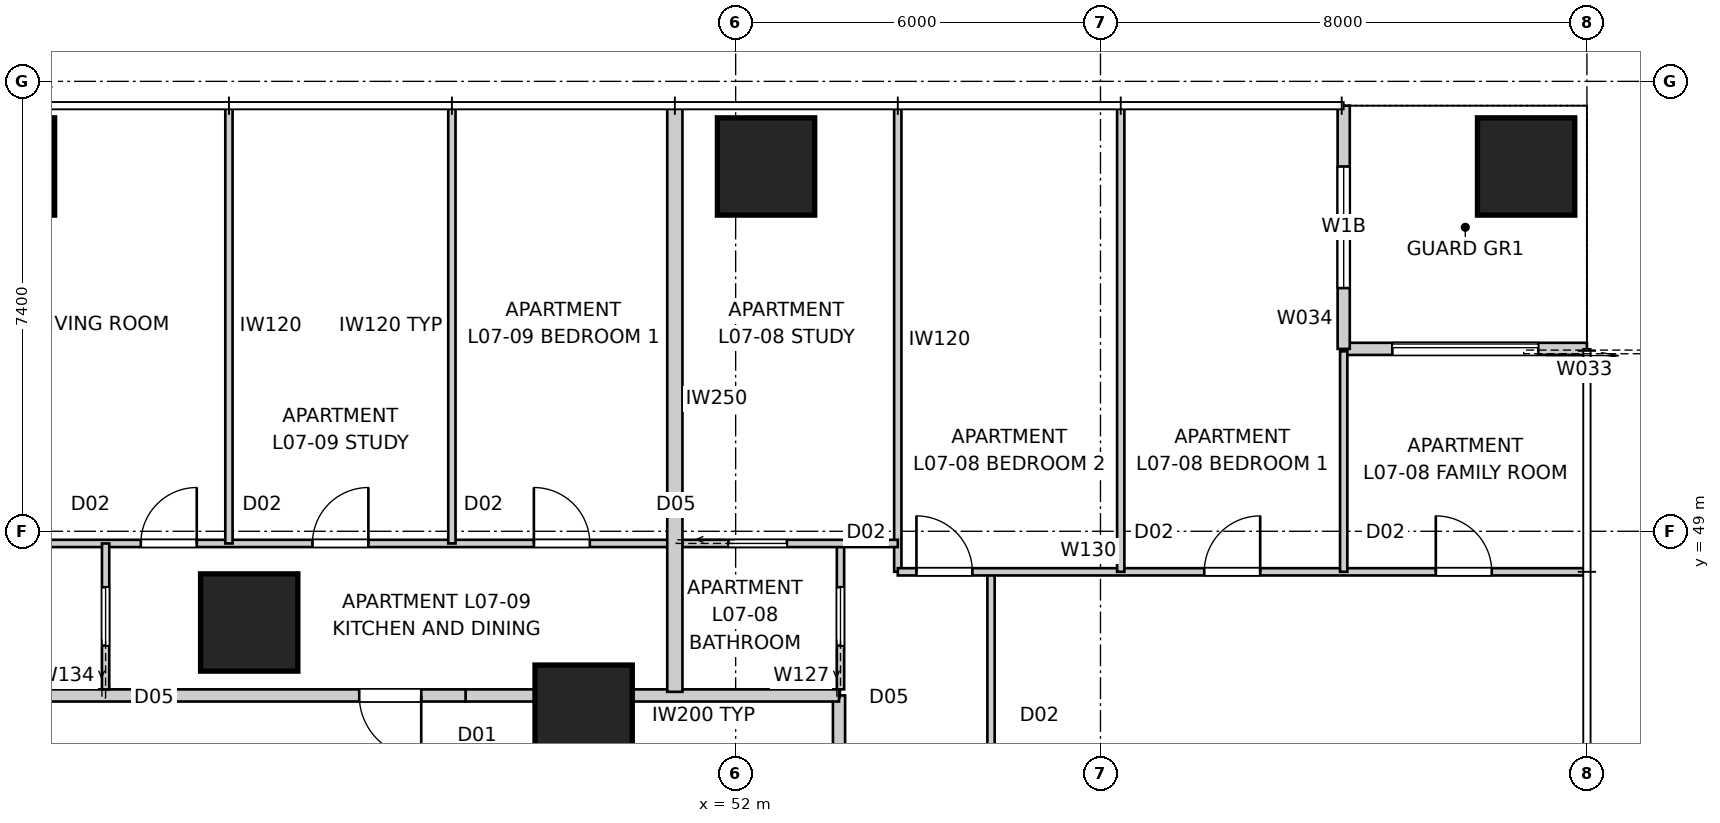
"""IFC4 building model, lengths in metres.
Left out: names, types, materials, properties, quantities, classifications, styles, units other than length and angle.
Written with IfcOpenShell. Run it as: python <this file> out.ifc"""

import sys

from ifc_helpers import new_model, si_unit, direction, frame, frame_2d, origin, origin_2d, place, context, subcontext, project, spatial, rectangle, extrude, element, fill, save


model = new_model("IFC4")
c1 = context("Model", 3, precision=1e-05, world=origin(), true_north=direction((0.0, 1.0)))
c2 = subcontext(c1, "Body", "Model", "MODEL_VIEW")
j1 = project(units=[si_unit("LENGTHUNIT", "METRE"), si_unit("PLANEANGLEUNIT", "RADIAN")], contexts=[c1])
p1 = place(None, origin())
s1 = spatial("IfcSite", under=j1, at=p1, CompositionType="ELEMENT")
p2 = place(p1, origin())
s2 = spatial("IfcBuilding", under=s1, at=p2, CompositionType="ELEMENT")
p3 = place(p2, frame((0.0, 0.0, 28.6)))
s3 = spatial("IfcBuildingStorey", under=s2, at=p3, CompositionType="ELEMENT", Elevation=28.6)
for number, where, z_axis, x_axis in (
    (1, (65.0, 55.0, 0.0), (0.0, 0.0, 1.0), (1.0, 0.0, 0.0)),
    (2, (52.5, 55.0, 0.0), (0.0, 0.0, 1.0), (1.0, 0.0, 0.0)),
    (3, (40.0, 55.0, 0.0), (0.0, 0.0, 1.0), (1.0, 0.0, 0.0)),
    (4, (49.5, 46.0, 0.0), (0.0, 0.0, 1.0), (1.0, 0.0, 0.0)),
    (5, (44.0, 47.5, 0.0), (0.0, 0.0, 1.0), (1.0, 0.0, 0.0)),
):
    element("IfcColumn", number, at=place(p3, frame(where, z_axis=z_axis, x_axis=x_axis)), inside=s3, PredefinedType="COLUMN", context=c2, shape_type="SweptSolid", body=[
        extrude(rectangle(XDim=1.6, YDim=1.6, at=origin_2d()), origin(), (0.0, 0.0, 1.0), 3.4),
    ])
p4 = place(p3, frame((66.0, 52.0, 0.0), z_axis=(0.0, 0.0, 1.0), x_axis=(-1.0, 0.0, 0.0)))
e6 = element("IfcWall", 6, at=p4, inside=s3, PredefinedType="SOLIDWALL", context=c2, shape_type="SweptSolid", body=[
    extrude(rectangle(XDim=4.0, YDim=0.2, at=frame_2d((2.0, 0.0))), origin(), (0.0, 0.0, 1.0), 3.25),
])
p5 = place(p4, frame((0.8, 0.0, 0.0)))
e7 = element("IfcOpeningElement", 7, at=p5, cuts=e6, PredefinedType="OPENING", context=c2, shape_type="SweptSolid", body=[
    extrude(rectangle(XDim=2.4, YDim=2.1, at=frame_2d((1.2, 1.05))), frame((0.0, 0.11, 0.0), z_axis=(0.0, -1.0, 0.0), x_axis=(1.0, 0.0, 0.0)), (0.0, 0.0, 1.0), 0.22),
])
p6 = place(p3, frame((62.0, 52.0, 0.0), z_axis=(0.0, 0.0, 1.0), x_axis=(0.0, 1.0, 0.0)))
e8 = element("IfcWall", 8, at=p6, inside=s3, PredefinedType="SOLIDWALL", context=c2, shape_type="SweptSolid", body=[
    extrude(rectangle(XDim=4.0, YDim=0.2, at=frame_2d((2.0, 0.0))), origin(), (0.0, 0.0, 1.0), 3.25),
])
p7 = place(p6, frame((1.0, 0.0, 0.45)))
e9 = element("IfcOpeningElement", 9, at=p7, cuts=e8, PredefinedType="OPENING", context=c2, shape_type="SweptSolid", body=[
    extrude(rectangle(XDim=2.0, YDim=1.8, at=frame_2d((1.0, 0.9))), frame((0.0, 0.11, 0.0), z_axis=(0.0, -1.0, 0.0), x_axis=(1.0, 0.0, 0.0)), (0.0, 0.0, 1.0), 0.22),
])
p8 = place(p3, frame((53.7, 13.7, 0.0), z_axis=(0.0, 0.0, 1.0), x_axis=(0.0, 1.0, 0.0)))
e10 = element("IfcWall", 10, at=p8, inside=s3, PredefinedType="PARTITIONING", context=c2, shape_type="SweptSolid", body=[
    extrude(rectangle(XDim=32.6, YDim=0.2, at=frame_2d((16.3, 0.0))), origin(), (0.0, 0.0, 1.0), 3.25),
])
p9 = place(p8, frame((2.315, 0.0, 0.0)))
e11 = element("IfcOpeningElement", 11, at=p9, cuts=e10, PredefinedType="OPENING", context=c2, shape_type="SweptSolid", body=[
    extrude(rectangle(XDim=1.02, YDim=2.34, at=frame_2d((0.51, 1.17))), frame((0.0, 0.11, 0.0), z_axis=(0.0, -1.0, 0.0), x_axis=(1.0, 0.0, 0.0)), (0.0, 0.0, 1.0), 0.22),
])
p10 = place(p8, frame((29.265, 0.0, 0.0)))
e12 = element("IfcOpeningElement", 12, at=p10, cuts=e10, PredefinedType="OPENING", context=c2, shape_type="SweptSolid", body=[
    extrude(rectangle(XDim=1.02, YDim=2.34, at=frame_2d((0.51, 1.17))), frame((0.0, 0.11, 0.0), z_axis=(0.0, -1.0, 0.0), x_axis=(1.0, 0.0, 0.0)), (0.0, 0.0, 1.0), 0.22),
])
p11 = place(p8, frame((20.646, 0.0, 0.0)))
e13 = element("IfcOpeningElement", 13, at=p11, cuts=e10, PredefinedType="OPENING", context=c2, shape_type="SweptSolid", body=[
    extrude(rectangle(XDim=1.02, YDim=2.34, at=frame_2d((0.51, 1.17))), frame((0.0, 0.11, 0.0), z_axis=(0.0, -1.0, 0.0), x_axis=(1.0, 0.0, 0.0)), (0.0, 0.0, 1.0), 0.22),
])
p12 = place(p8, frame((13.626, 0.0, 0.0)))
e14 = element("IfcOpeningElement", 14, at=p12, cuts=e10, PredefinedType="OPENING", context=c2, shape_type="SweptSolid", body=[
    extrude(rectangle(XDim=1.02, YDim=2.34, at=frame_2d((0.51, 1.17))), frame((0.0, 0.11, 0.0), z_axis=(0.0, -1.0, 0.0), x_axis=(1.0, 0.0, 0.0)), (0.0, 0.0, 1.0), 0.22),
])
p13 = place(p3, frame((53.7, 46.3, 0.0), z_axis=(0.0, 0.0, 1.0), x_axis=(-1.0, 0.0, 0.0)))
e15 = element("IfcWall", 15, at=p13, inside=s3, PredefinedType="PARTITIONING", context=c2, shape_type="SweptSolid", body=[
    extrude(rectangle(XDim=4.458, YDim=0.2, at=frame_2d((2.229, 0.0))), origin(), (0.0, 0.0, 1.0), 3.25),
])
p14 = place(p3, frame((49.242, 46.3, 0.0), z_axis=(0.0, 0.0, 1.0), x_axis=(-1.0, 0.0, 0.0)))
e16 = element("IfcWall", 16, at=p14, inside=s3, PredefinedType="PARTITIONING", context=c2, shape_type="SweptSolid", body=[
    extrude(rectangle(XDim=1.683, YDim=0.2, at=frame_2d((0.842, 0.0))), origin(), (0.0, 0.0, 1.0), 2.55),
])
p15 = place(p3, frame((47.558, 46.3, 0.0), z_axis=(0.0, 0.0, 1.0), x_axis=(-1.0, 0.0, 0.0)))
e17 = element("IfcWall", 17, at=p15, inside=s3, PredefinedType="PARTITIONING", context=c2, shape_type="SweptSolid", body=[
    extrude(rectangle(XDim=15.117, YDim=0.2, at=frame_2d((7.558, 0.0))), origin(), (0.0, 0.0, 1.0), 3.25),
])
p16 = place(p15, frame((0.729, 0.0, 0.0)))
e18 = element("IfcOpeningElement", 18, at=p16, cuts=e17, PredefinedType="OPENING", context=c2, shape_type="SweptSolid", body=[
    extrude(rectangle(XDim=1.02, YDim=2.34, at=frame_2d((0.51, 1.17))), frame((0.0, 0.11, 0.0), z_axis=(0.0, -1.0, 0.0), x_axis=(1.0, 0.0, 0.0)), (0.0, 0.0, 1.0), 0.22),
])
p17 = place(p3, frame((51.0, 56.0, 0.0), z_axis=(0.0, 0.0, 1.0), x_axis=(0.0, -1.0, 0.0)))
e19 = element("IfcWall", 19, at=p17, inside=s3, PredefinedType="PARTITIONING", context=c2, shape_type="SweptSolid", body=[
    extrude(rectangle(XDim=9.64, YDim=0.25, at=frame_2d((4.82, 0.0))), origin(), (0.0, 0.0, 1.0), 3.25),
])
p18 = place(p3, frame((53.724, 46.4, 0.0), z_axis=(0.0, 0.0, 1.0), x_axis=(0.0, 1.0, 0.0)))
e20 = element("IfcWall", 20, at=p18, inside=s3, PredefinedType="PARTITIONING", context=c2, shape_type="SweptSolid", body=[
    extrude(rectangle(XDim=2.4, YDim=0.12, at=frame_2d((1.2, 0.0))), origin(), (0.0, 0.0, 1.0), 3.25),
])
p19 = place(p18, frame((0.72, 0.0, 0.0)))
e21 = element("IfcOpeningElement", 21, at=p19, cuts=e20, PredefinedType="OPENING", context=c2, shape_type="SweptSolid", body=[
    extrude(rectangle(XDim=0.96, YDim=2.1, at=frame_2d((0.48, 1.05))), frame((0.0, 0.07, 0.0), z_axis=(0.0, -1.0, 0.0), x_axis=(1.0, 0.0, 0.0)), (0.0, 0.0, 1.0), 0.14),
])
p20 = place(p3, frame((56.2, 48.333, 0.0), z_axis=(0.0, 0.0, 1.0), x_axis=(0.0, -1.0, 0.0)))
e22 = element("IfcWall", 22, at=p20, inside=s3, PredefinedType="PARTITIONING", context=c2, shape_type="SweptSolid", body=[
    extrude(rectangle(XDim=7.333, YDim=0.12, at=frame_2d((3.667, 0.0))), origin(), (0.0, 0.0, 1.0), 3.25),
])
p21 = place(p20, frame((3.207, 0.0, 0.0)))
e23 = element("IfcOpeningElement", 23, at=p21, cuts=e22, PredefinedType="OPENING", context=c2, shape_type="SweptSolid", body=[
    extrude(rectangle(XDim=0.92, YDim=2.34, at=frame_2d((0.46, 1.17))), frame((0.0, 0.07, 0.0), z_axis=(0.0, -1.0, 0.0), x_axis=(1.0, 0.0, 0.0)), (0.0, 0.0, 1.0), 0.14),
])
p22 = place(p3, frame((54.667, 55.96, 0.0), z_axis=(0.0, 0.0, 1.0), x_axis=(0.0, -1.0, 0.0)))
e24 = element("IfcWall", 24, at=p22, inside=s3, PredefinedType="PARTITIONING", context=c2, shape_type="SweptSolid", body=[
    extrude(rectangle(XDim=7.627, YDim=0.12, at=frame_2d((3.813, 0.0))), origin(), (0.0, 0.0, 1.0), 2.638),
])
p23 = place(p3, frame((54.667, 48.333, 0.0), z_axis=(0.0, 0.0, 1.0), x_axis=(1.0, 0.0, 0.0)))
e25 = element("IfcWall", 25, at=p23, inside=s3, PredefinedType="PARTITIONING", context=c2, shape_type="SweptSolid", body=[
    extrude(rectangle(XDim=11.293, YDim=0.12, at=frame_2d((5.646, 0.0))), origin(), (0.0, 0.0, 1.0), 3.25),
])
p24 = place(p23, frame((0.307, 0.0, 0.0)))
e26 = element("IfcOpeningElement", 26, at=p24, cuts=e25, PredefinedType="OPENING", context=c2, shape_type="SweptSolid", body=[
    extrude(rectangle(XDim=0.92, YDim=2.34, at=frame_2d((0.46, 1.17))), frame((0.0, 0.07, 0.0), z_axis=(0.0, -1.0, 0.0), x_axis=(1.0, 0.0, 0.0)), (0.0, 0.0, 1.0), 0.14),
])
p25 = place(p23, frame((8.848, 0.0, 0.0)))
e27 = element("IfcOpeningElement", 27, at=p25, cuts=e25, PredefinedType="OPENING", context=c2, shape_type="SweptSolid", body=[
    extrude(rectangle(XDim=0.92, YDim=2.34, at=frame_2d((0.46, 1.17))), frame((0.0, 0.07, 0.0), z_axis=(0.0, -1.0, 0.0), x_axis=(1.0, 0.0, 0.0)), (0.0, 0.0, 1.0), 0.14),
])
p26 = place(p23, frame((5.04, 0.0, 0.0)))
e28 = element("IfcOpeningElement", 28, at=p26, cuts=e25, PredefinedType="OPENING", context=c2, shape_type="SweptSolid", body=[
    extrude(rectangle(XDim=0.92, YDim=2.34, at=frame_2d((0.46, 1.17))), frame((0.0, 0.07, 0.0), z_axis=(0.0, -1.0, 0.0), x_axis=(1.0, 0.0, 0.0)), (0.0, 0.0, 1.0), 0.14),
])
p27 = place(p3, frame((25.333, 48.8, 0.0), z_axis=(0.0, 0.0, 1.0), x_axis=(1.0, 0.0, 0.0)))
e29 = element("IfcWall", 29, at=p27, inside=s3, PredefinedType="PARTITIONING", context=c2, shape_type="SweptSolid", body=[
    extrude(rectangle(XDim=29.333, YDim=0.12, at=frame_2d((14.667, 0.0))), origin(), (0.0, 0.0, 1.0), 3.25),
])
p28 = place(p27, frame((19.707, 0.0, 0.0)))
e30 = element("IfcOpeningElement", 30, at=p28, cuts=e29, PredefinedType="OPENING", context=c2, shape_type="SweptSolid", body=[
    extrude(rectangle(XDim=0.92, YDim=2.34, at=frame_2d((0.46, 1.17))), frame((0.0, 0.07, 0.0), z_axis=(0.0, -1.0, 0.0), x_axis=(1.0, 0.0, 0.0)), (0.0, 0.0, 1.0), 0.14),
])
p29 = place(p27, frame((23.348, 0.0, 0.0)))
e31 = element("IfcOpeningElement", 31, at=p29, cuts=e29, PredefinedType="OPENING", context=c2, shape_type="SweptSolid", body=[
    extrude(rectangle(XDim=0.92, YDim=2.34, at=frame_2d((0.46, 1.17))), frame((0.0, 0.07, 0.0), z_axis=(0.0, -1.0, 0.0), x_axis=(1.0, 0.0, 0.0)), (0.0, 0.0, 1.0), 0.14),
])
p30 = place(p27, frame((16.884, 0.0, 0.0)))
e32 = element("IfcOpeningElement", 32, at=p30, cuts=e29, PredefinedType="OPENING", context=c2, shape_type="SweptSolid", body=[
    extrude(rectangle(XDim=0.92, YDim=2.34, at=frame_2d((0.46, 1.17))), frame((0.0, 0.07, 0.0), z_axis=(0.0, -1.0, 0.0), x_axis=(1.0, 0.0, 0.0)), (0.0, 0.0, 1.0), 0.14),
])
p31 = place(p27, frame((26.549, 0.0, 0.0)))
e33 = element("IfcOpeningElement", 33, at=p31, cuts=e29, PredefinedType="OPENING", context=c2, shape_type="SweptSolid", body=[
    extrude(rectangle(XDim=0.96, YDim=2.1, at=frame_2d((0.48, 1.05))), frame((0.0, 0.07, 0.0), z_axis=(0.0, -1.0, 0.0), x_axis=(1.0, 0.0, 0.0)), (0.0, 0.0, 1.0), 0.14),
])
p32 = place(p27, frame((1.844, 0.0, 0.0)))
e34 = element("IfcOpeningElement", 34, at=p32, cuts=e29, PredefinedType="OPENING", context=c2, shape_type="SweptSolid", body=[
    extrude(rectangle(XDim=0.96, YDim=2.1, at=frame_2d((0.48, 1.05))), frame((0.0, 0.07, 0.0), z_axis=(0.0, -1.0, 0.0), x_axis=(1.0, 0.0, 0.0)), (0.0, 0.0, 1.0), 0.14),
])
p33 = place(p27, frame((8.484, 0.0, 0.0)))
e35 = element("IfcOpeningElement", 35, at=p33, cuts=e29, PredefinedType="OPENING", context=c2, shape_type="SweptSolid", body=[
    extrude(rectangle(XDim=0.96, YDim=2.1, at=frame_2d((0.48, 1.05))), frame((0.0, 0.07, 0.0), z_axis=(0.0, -1.0, 0.0), x_axis=(1.0, 0.0, 0.0)), (0.0, 0.0, 1.0), 0.14),
])
p34 = place(p3, frame((58.333, 48.333, 0.0), z_axis=(0.0, 0.0, 1.0), x_axis=(0.0, 1.0, 0.0)))
e36 = element("IfcWall", 36, at=p34, inside=s3, PredefinedType="PARTITIONING", context=c2, shape_type="SweptSolid", body=[
    extrude(rectangle(XDim=7.627, YDim=0.12, at=frame_2d((3.813, 0.0))), origin(), (0.0, 0.0, 1.0), 3.25),
])
p35 = place(p3, frame((62.0, 51.96, 0.0), z_axis=(0.0, 0.0, 1.0), x_axis=(0.0, -1.0, 0.0)))
e37 = element("IfcWall", 37, at=p35, inside=s3, PredefinedType="PARTITIONING", context=c2, shape_type="SweptSolid", body=[
    extrude(rectangle(XDim=3.627, YDim=0.12, at=frame_2d((1.813, 0.0))), origin(), (0.0, 0.0, 1.0), 3.25),
])
p36 = place(p3, frame((41.638, 46.4, 0.0), z_axis=(0.0, 0.0, 1.0), x_axis=(0.0, 1.0, 0.0)))
e38 = element("IfcWall", 38, at=p36, inside=s3, PredefinedType="PARTITIONING", context=c2, shape_type="SweptSolid", body=[
    extrude(rectangle(XDim=2.4, YDim=0.12, at=frame_2d((1.2, 0.0))), origin(), (0.0, 0.0, 1.0), 3.25),
])
p37 = place(p36, frame((0.72, 0.0, 0.0)))
e39 = element("IfcOpeningElement", 39, at=p37, cuts=e38, PredefinedType="OPENING", context=c2, shape_type="SweptSolid", body=[
    extrude(rectangle(XDim=0.96, YDim=2.1, at=frame_2d((0.48, 1.05))), frame((0.0, 0.07, 0.0), z_axis=(0.0, -1.0, 0.0), x_axis=(1.0, 0.0, 0.0)), (0.0, 0.0, 1.0), 0.14),
])
for number, where, z_axis, x_axis in (
    (40, (43.667, 55.96, 0.0), (0.0, 0.0, 1.0), (0.0, -1.0, 0.0)),
    (41, (47.333, 48.8, 0.0), (0.0, 0.0, 1.0), (0.0, 1.0, 0.0)),
):
    element("IfcWall", number, at=place(p3, frame(where, z_axis=z_axis, x_axis=x_axis)), inside=s3, PredefinedType="PARTITIONING", context=c2, shape_type="SweptSolid", body=[
        extrude(rectangle(XDim=7.16, YDim=0.12, at=frame_2d((3.58, 0.0))), origin(), (0.0, 0.0, 1.0), 3.25),
    ])
p38 = place(p5, origin())
e42 = element("IfcDoor", 42, at=p38, inside=s3, OperationType="SLIDING_TO_LEFT", PredefinedType="DOOR", context=c2, shape_type="SweptSolid", body=[
    extrude(rectangle(XDim=2.4, YDim=2.1, at=frame_2d((1.2, 1.05))), frame((0.0, 0.025, 0.0), z_axis=(0.0, -1.0, 0.0), x_axis=(1.0, 0.0, 0.0)), (0.0, 0.0, 1.0), 0.05),
])
fill(e7, e42)
p39 = place(p7, origin())
e43 = element("IfcWindow", 43, at=p39, inside=s3, PartitioningType="SINGLE_PANEL", PredefinedType="WINDOW", context=c2, shape_type="SweptSolid", body=[
    extrude(rectangle(XDim=2.0, YDim=1.8, at=frame_2d((1.0, 0.9))), frame((0.0, 0.03, 0.0), z_axis=(0.0, -1.0, 0.0), x_axis=(1.0, 0.0, 0.0)), (0.0, 0.0, 1.0), 0.06),
])
fill(e9, e43)
p40 = place(p16, origin())
e44 = element("IfcDoor", 44, at=p40, inside=s3, OperationType="SINGLE_SWING_LEFT", PredefinedType="DOOR", context=c2, shape_type="SweptSolid", body=[
    extrude(rectangle(XDim=1.02, YDim=2.34, at=frame_2d((0.51, 1.17))), frame((0.0, 0.025, 0.0), z_axis=(0.0, -1.0, 0.0), x_axis=(1.0, 0.0, 0.0)), (0.0, 0.0, 1.0), 0.05),
])
fill(e18, e44)
p41 = place(p28, origin())
e45 = element("IfcDoor", 45, at=p41, inside=s3, OperationType="SINGLE_SWING_RIGHT", PredefinedType="DOOR", context=c2, shape_type="SweptSolid", body=[
    extrude(rectangle(XDim=0.92, YDim=2.34, at=frame_2d((0.46, 1.17))), frame((0.0, 0.025, 0.0), z_axis=(0.0, -1.0, 0.0), x_axis=(1.0, 0.0, 0.0)), (0.0, 0.0, 1.0), 0.05),
])
fill(e30, e45)
p42 = place(p29, origin())
e46 = element("IfcDoor", 46, at=p42, inside=s3, OperationType="SINGLE_SWING_LEFT", PredefinedType="DOOR", context=c2, shape_type="SweptSolid", body=[
    extrude(rectangle(XDim=0.92, YDim=2.34, at=frame_2d((0.46, 1.17))), frame((0.0, 0.025, 0.0), z_axis=(0.0, -1.0, 0.0), x_axis=(1.0, 0.0, 0.0)), (0.0, 0.0, 1.0), 0.05),
])
fill(e31, e46)
p43 = place(p37, origin())
e47 = element("IfcDoor", 47, at=p43, inside=s3, OperationType="SLIDING_TO_LEFT", PredefinedType="DOOR", context=c2, shape_type="SweptSolid", body=[
    extrude(rectangle(XDim=0.96, YDim=2.1, at=frame_2d((0.48, 1.05))), frame((0.0, 0.025, 0.0), z_axis=(0.0, -1.0, 0.0), x_axis=(1.0, 0.0, 0.0)), (0.0, 0.0, 1.0), 0.05),
])
fill(e39, e47)
p44 = place(p30, origin())
e48 = element("IfcDoor", 48, at=p44, inside=s3, OperationType="SINGLE_SWING_RIGHT", PredefinedType="DOOR", context=c2, shape_type="SweptSolid", body=[
    extrude(rectangle(XDim=0.92, YDim=2.34, at=frame_2d((0.46, 1.17))), frame((0.0, 0.025, 0.0), z_axis=(0.0, -1.0, 0.0), x_axis=(1.0, 0.0, 0.0)), (0.0, 0.0, 1.0), 0.05),
])
fill(e32, e48)
p45 = place(p19, origin())
e49 = element("IfcDoor", 49, at=p45, inside=s3, OperationType="SLIDING_TO_LEFT", PredefinedType="DOOR", context=c2, shape_type="SweptSolid", body=[
    extrude(rectangle(XDim=0.96, YDim=2.1, at=frame_2d((0.48, 1.05))), frame((0.0, 0.025, 0.0), z_axis=(0.0, -1.0, 0.0), x_axis=(1.0, 0.0, 0.0)), (0.0, 0.0, 1.0), 0.05),
])
fill(e21, e49)
p46 = place(p24, origin())
e50 = element("IfcDoor", 50, at=p46, inside=s3, OperationType="SINGLE_SWING_LEFT", PredefinedType="DOOR", context=c2, shape_type="SweptSolid", body=[
    extrude(rectangle(XDim=0.92, YDim=2.34, at=frame_2d((0.46, 1.17))), frame((0.0, 0.025, 0.0), z_axis=(0.0, -1.0, 0.0), x_axis=(1.0, 0.0, 0.0)), (0.0, 0.0, 1.0), 0.05),
])
fill(e26, e50)
p47 = place(p25, origin())
e51 = element("IfcDoor", 51, at=p47, inside=s3, OperationType="SINGLE_SWING_LEFT", PredefinedType="DOOR", context=c2, shape_type="SweptSolid", body=[
    extrude(rectangle(XDim=0.92, YDim=2.34, at=frame_2d((0.46, 1.17))), frame((0.0, 0.025, 0.0), z_axis=(0.0, -1.0, 0.0), x_axis=(1.0, 0.0, 0.0)), (0.0, 0.0, 1.0), 0.05),
])
fill(e27, e51)
p48 = place(p26, origin())
e52 = element("IfcDoor", 52, at=p48, inside=s3, OperationType="SINGLE_SWING_RIGHT", PredefinedType="DOOR", context=c2, shape_type="SweptSolid", body=[
    extrude(rectangle(XDim=0.92, YDim=2.34, at=frame_2d((0.46, 1.17))), frame((0.0, 0.025, 0.0), z_axis=(0.0, -1.0, 0.0), x_axis=(1.0, 0.0, 0.0)), (0.0, 0.0, 1.0), 0.05),
])
fill(e28, e52)
p49 = place(p31, origin())
e53 = element("IfcDoor", 53, at=p49, inside=s3, OperationType="SLIDING_TO_LEFT", PredefinedType="DOOR", context=c2, shape_type="SweptSolid", body=[
    extrude(rectangle(XDim=0.96, YDim=2.1, at=frame_2d((0.48, 1.05))), frame((0.0, 0.025, 0.0), z_axis=(0.0, -1.0, 0.0), x_axis=(1.0, 0.0, 0.0)), (0.0, 0.0, 1.0), 0.05),
])
fill(e33, e53)
save(model, sys.argv[1])
